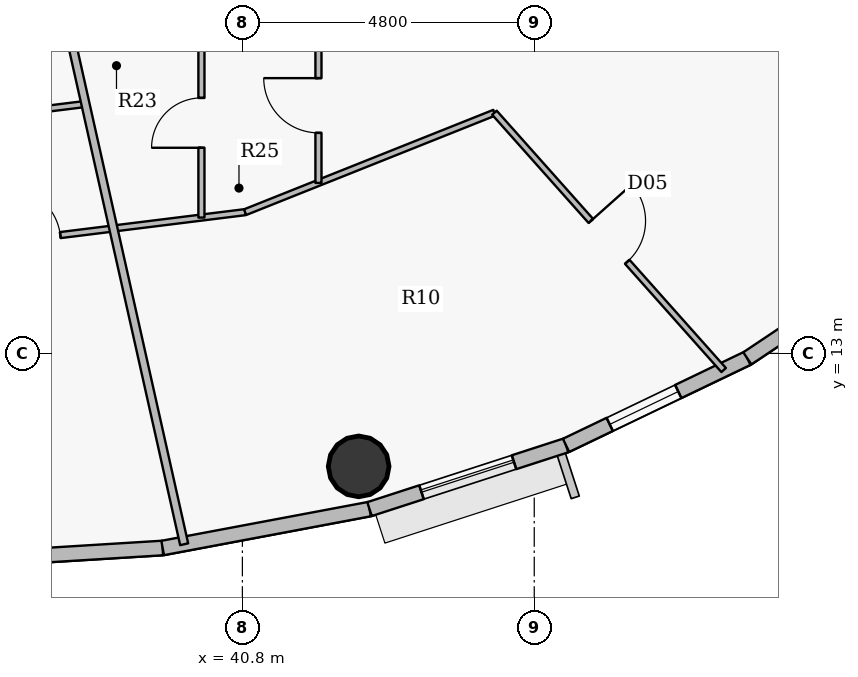
"""IFC4 building model, lengths in metres.
Left out: names, types, materials, properties, quantities, classifications, styles, units other than length and angle.
Written with IfcOpenShell. Run it as: python <this file> out.ifc"""

import sys

from ifc_helpers import new_model, si_unit, direction, frame, frame_2d, origin, origin_2d, place, context, subcontext, project, spatial, rectangle, hollow_circle, extrude, source, transform, mapped, element, fill, save


model = new_model("IFC4")
c1 = context("Model", 3, precision=1e-05, world=origin(), true_north=direction((0.0, 1.0)))
c2 = subcontext(c1, "Body", "Model", "MODEL_VIEW")
j1 = project(units=[si_unit("LENGTHUNIT", "METRE"), si_unit("PLANEANGLEUNIT", "RADIAN")], contexts=[c1])
p1 = place(None, origin())
s1 = spatial("IfcSite", under=j1, at=p1, CompositionType="ELEMENT")
p2 = place(p1, origin())
s2 = spatial("IfcBuilding", under=s1, at=p2, CompositionType="ELEMENT")
p3 = place(p2, frame((0.0, 0.0, 299.25)))
s3 = spatial("IfcBuildingStorey", under=s2, at=p3, CompositionType="ELEMENT", Elevation=299.25)
p4 = place(p3, frame((42.712, 11.142, 0.0), z_axis=(0.0, 0.0, 1.0), x_axis=(1.0, 0.0, 0.0)))
e1 = element("IfcColumn", 1, at=p4, inside=s3, PredefinedType="COLUMN", context=c2, shape_type="SweptSolid", body=[
    extrude(hollow_circle(Radius=0.5, WallThickness=0.032, at=origin_2d()), origin(), (0.0, 0.0, 1.0), 3.75),
])
p5 = place(p3, frame((39.489, 9.8, 0.0), z_axis=(0.0, 0.0, 1.0), x_axis=(-0.998104946479, -0.061534671648, 0.0)))
e2 = element("IfcWall", 2, at=p5, inside=s3, PredefinedType="SOLIDWALL", context=c2, shape_type="SweptSolid", body=[
    extrude(rectangle(XDim=3.495, YDim=0.24, at=frame_2d((1.748, 0.0))), origin(), (0.0, 0.0, 1.0), 3.5),
])
p6 = place(p3, frame((42.891, 10.44, 0.0), z_axis=(0.0, 0.0, 1.0), x_axis=(-0.982782655757, -0.184765395959, 0.0)))
e3 = element("IfcWall", 3, at=p6, inside=s3, PredefinedType="SOLIDWALL", context=c2, shape_type="SweptSolid", body=[
    extrude(rectangle(XDim=3.462, YDim=0.24, at=frame_2d((1.731, 0.0))), origin(), (0.0, 0.0, 1.0), 3.5),
])
p7 = place(p3, frame((46.123, 11.488, 0.0), z_axis=(0.0, 0.0, 1.0), x_axis=(-0.95123136723, -0.308478339592, 0.0)))
e4 = element("IfcWall", 4, at=p7, inside=s3, PredefinedType="SOLIDWALL", context=c2, shape_type="SweptSolid", body=[
    extrude(rectangle(XDim=3.398, YDim=0.24, at=frame_2d((1.699, 0.0))), origin(), (0.0, 0.0, 1.0), 3.5),
])
p8 = place(p7, frame((0.899, 0.0, 0.9)))
e5 = element("IfcOpeningElement", 5, at=p8, cuts=e4, PredefinedType="OPENING", context=c2, shape_type="SweptSolid", body=[
    extrude(rectangle(XDim=1.6, YDim=1.75, at=origin_2d()), frame((0.8, 0.13, 0.875), z_axis=(0.0, -1.0, 0.0), x_axis=(1.0, 0.0, 0.0)), (0.0, 0.0, 1.0), 0.26),
])
p9 = place(p3, frame((49.104, 12.918, 0.0), z_axis=(0.0, 0.0, 1.0), x_axis=(-0.901573741254, -0.43262546051, 0.0)))
e6 = element("IfcWall", 6, at=p9, inside=s3, PredefinedType="SOLIDWALL", context=c2, shape_type="SweptSolid", body=[
    extrude(rectangle(XDim=3.307, YDim=0.24, at=frame_2d((1.653, 0.0))), origin(), (0.0, 0.0, 1.0), 3.5),
])
p10 = place(p9, frame((1.26, 0.0, 0.9)))
e7 = element("IfcOpeningElement", 7, at=p10, cuts=e6, PredefinedType="OPENING", context=c2, shape_type="SweptSolid", body=[
    extrude(rectangle(XDim=1.25, YDim=1.65, at=origin_2d()), frame((0.625, 0.13, 0.825), z_axis=(0.0, -1.0, 0.0), x_axis=(1.0, 0.0, 0.0)), (0.0, 0.0, 1.0), 0.26),
])
p11 = place(p3, frame((51.762, 14.696, 0.0), z_axis=(0.0, 0.0, 1.0), x_axis=(-0.831250592635, -0.55589787933, 0.0)))
e8 = element("IfcWall", 8, at=p11, inside=s3, PredefinedType="SOLIDWALL", context=c2, shape_type="SweptSolid", body=[
    extrude(rectangle(XDim=3.197, YDim=0.24, at=frame_2d((1.599, 0.0))), origin(), (0.0, 0.0, 1.0), 3.5),
])
p12 = place(p11, frame((0.799, 0.0, 0.9)))
e9 = element("IfcOpeningElement", 9, at=p12, cuts=e8, PredefinedType="OPENING", context=c2, shape_type="SweptSolid", body=[
    extrude(rectangle(XDim=1.6, YDim=1.75, at=origin_2d()), frame((0.8, 0.13, 0.875), z_axis=(0.0, -1.0, 0.0), x_axis=(1.0, 0.0, 0.0)), (0.0, 0.0, 1.0), 0.26),
])
p13 = place(p3, frame((36.0, 14.722, 0.0), z_axis=(0.0, 0.0, 1.0), x_axis=(0.99239360053, 0.123105408601, 0.0)))
e10 = element("IfcWall", 10, at=p13, inside=s3, PredefinedType="PARTITIONING", context=c2, shape_type="SweptSolid", body=[
    extrude(rectangle(XDim=4.883, YDim=0.1, at=frame_2d((2.441, 0.0))), origin(), (0.0, 0.0, 1.0), 3.035),
])
p14 = place(p13, frame((0.919, 0.0, 0.0)))
e11 = element("IfcOpeningElement", 11, at=p14, cuts=e10, PredefinedType="OPENING", context=c2, shape_type="SweptSolid", body=[
    extrude(rectangle(XDim=0.9, YDim=2.1, at=origin_2d()), frame((0.45, 0.06, 1.05), z_axis=(0.0, -1.0, 0.0), x_axis=(1.0, 0.0, 0.0)), (0.0, 0.0, 1.0), 0.12),
])
p15 = place(p3, frame((36.0, 16.827, 0.0), z_axis=(0.0, 0.0, 1.0), x_axis=(0.992401670171, 0.123040339085, 0.0)))
e12 = element("IfcWall", 12, at=p15, inside=s3, PredefinedType="PARTITIONING", context=c2, shape_type="SweptSolid", body=[
    extrude(rectangle(XDim=2.236, YDim=0.1, at=frame_2d((1.118, 0.0))), origin(), (0.0, 0.0, 1.0), 3.035),
])
p16 = place(p3, frame((37.939, 18.35, 0.0), z_axis=(0.0, 0.0, 1.0), x_axis=(0.218784248646, -0.975773258777, 0.0)))
e13 = element("IfcWall", 13, at=p16, inside=s3, PredefinedType="PARTITIONING", context=c2, shape_type="SweptSolid", body=[
    extrude(rectangle(XDim=8.699, YDim=0.135, at=frame_2d((4.35, 0.0))), origin(), (0.0, 0.0, 1.0), 2.985),
])
p17 = place(p3, frame((40.126, 15.234, 0.0), z_axis=(0.0, 0.0, 1.0), x_axis=(0.0, 1.0, 0.0)))
e14 = element("IfcWall", 14, at=p17, inside=s3, PredefinedType="PARTITIONING", context=c2, shape_type="SweptSolid", body=[
    extrude(rectangle(XDim=3.116, YDim=0.1, at=frame_2d((1.558, 0.0))), origin(), (0.0, 0.0, 1.0), 3.035),
])
p18 = place(p17, frame((1.148, 0.0, 0.0)))
e15 = element("IfcOpeningElement", 15, at=p18, cuts=e14, PredefinedType="OPENING", context=c2, shape_type="SweptSolid", body=[
    extrude(rectangle(XDim=0.82, YDim=2.1, at=origin_2d()), frame((0.41, 0.06, 1.05), z_axis=(0.0, -1.0, 0.0), x_axis=(1.0, 0.0, 0.0)), (0.0, 0.0, 1.0), 0.12),
])
p19 = place(p3, frame((40.845, 15.323, 0.0), z_axis=(0.0, 0.0, 1.0), x_axis=(0.928815810282, 0.370541752804, 0.0)))
e16 = element("IfcWall", 16, at=p19, inside=s3, PredefinedType="PARTITIONING", context=c2, shape_type="SweptSolid", body=[
    extrude(rectangle(XDim=4.414, YDim=0.1, at=frame_2d((2.207, 0.0))), origin(), (0.0, 0.0, 1.0), 3.035),
])
p20 = place(p3, frame((42.051, 15.804, 0.0), z_axis=(0.0, 0.0, 1.0), x_axis=(0.0, 1.0, 0.0)))
e17 = element("IfcWall", 17, at=p20, inside=s3, PredefinedType="PARTITIONING", context=c2, shape_type="SweptSolid", body=[
    extrude(rectangle(XDim=2.546, YDim=0.1, at=frame_2d((1.273, 0.0))), origin(), (0.0, 0.0, 1.0), 3.5),
])
p21 = place(p20, frame((0.823, 0.0, 0.0)))
e18 = element("IfcOpeningElement", 18, at=p21, cuts=e17, PredefinedType="OPENING", context=c2, shape_type="SweptSolid", body=[
    extrude(rectangle(XDim=0.9, YDim=2.1, at=origin_2d()), frame((0.45, 0.06, 1.05), z_axis=(0.0, -1.0, 0.0), x_axis=(1.0, 0.0, 0.0)), (0.0, 0.0, 1.0), 0.12),
])
p22 = place(p3, frame((44.945, 16.958, 0.0), z_axis=(0.0, 0.0, 1.0), x_axis=(0.665162818086, -0.746698349694, 0.0)))
e19 = element("IfcWall", 19, at=p22, inside=s3, PredefinedType="PARTITIONING", context=c2, shape_type="SweptSolid", body=[
    extrude(rectangle(XDim=5.668, YDim=0.1, at=frame_2d((2.834, 0.0))), origin(), (0.0, 0.0, 1.0), 2.985),
])
p23 = place(p22, frame((2.384, 0.0, 0.0)))
e20 = element("IfcOpeningElement", 20, at=p23, cuts=e19, PredefinedType="OPENING", context=c2, shape_type="SweptSolid", body=[
    extrude(rectangle(XDim=0.9, YDim=2.1, at=origin_2d()), frame((0.45, 0.06, 1.05), z_axis=(0.0, -1.0, 0.0), x_axis=(1.0, 0.0, 0.0)), (0.0, 0.0, 1.0), 0.12),
])
m1 = source(origin(), c2, "Body", "SweptSolid", [
    extrude(rectangle(XDim=1.6, YDim=1.75, at=origin_2d()), frame((0.8, 0.03, 0.875), z_axis=(0.0, -1.0, 0.0), x_axis=(1.0, 0.0, 0.0)), (0.0, 0.0, 1.0), 0.06),
])
p24 = place(p8, origin())
e21 = element("IfcWindow", 21, at=p24, inside=s3, PartitioningType="DOUBLE_PANEL_VERTICAL", PredefinedType="WINDOW", context=c2, shape_type="MappedRepresentation", body=[
    mapped(m1, transform((0.0, 0.0, 0.0), x_axis=(1.0, 0.0, 0.0), y_axis=(0.0, 1.0, 0.0), z_axis=(0.0, 0.0, 1.0), scale=1.0)),
])
fill(e5, e21)
m2 = source(origin(), c2, "Body", "SweptSolid", [
    extrude(rectangle(XDim=1.25, YDim=1.65, at=origin_2d()), frame((0.625, 0.03, 0.825), z_axis=(0.0, -1.0, 0.0), x_axis=(1.0, 0.0, 0.0)), (0.0, 0.0, 1.0), 0.06),
])
p25 = place(p10, origin())
e22 = element("IfcWindow", 22, at=p25, inside=s3, PartitioningType="SINGLE_PANEL", PredefinedType="WINDOW", context=c2, shape_type="MappedRepresentation", body=[
    mapped(m2, transform((0.0, 0.0, 0.0), x_axis=(1.0, 0.0, 0.0), y_axis=(0.0, 1.0, 0.0), z_axis=(0.0, 0.0, 1.0), scale=1.0)),
])
fill(e7, e22)
m3 = source(origin(), c2, "Body", "SweptSolid", [
    extrude(rectangle(XDim=0.9, YDim=2.1, at=origin_2d()), frame((0.45, 0.025, 1.05), z_axis=(0.0, -1.0, 0.0), x_axis=(1.0, 0.0, 0.0)), (0.0, 0.0, 1.0), 0.05),
])
p26 = place(p14, origin())
e23 = element("IfcDoor", 23, at=p26, inside=s3, OperationType="SINGLE_SWING_LEFT", PredefinedType="DOOR", context=c2, shape_type="MappedRepresentation", body=[
    mapped(m3, transform((0.0, 0.0, 0.0), x_axis=(1.0, 0.0, 0.0), y_axis=(0.0, 1.0, 0.0), z_axis=(0.0, 0.0, 1.0), scale=1.0)),
])
fill(e11, e23)
p27 = place(p23, origin())
e24 = element("IfcDoor", 24, at=p27, inside=s3, OperationType="SINGLE_SWING_LEFT", PredefinedType="DOOR", context=c2, shape_type="MappedRepresentation", body=[
    mapped(m3, transform((0.0, 0.0, 0.0), x_axis=(1.0, 0.0, 0.0), y_axis=(0.0, 1.0, 0.0), z_axis=(0.0, 0.0, 1.0), scale=1.0)),
])
fill(e20, e24)
p28 = place(p21, origin())
e25 = element("IfcDoor", 25, at=p28, inside=s3, OperationType="SINGLE_SWING_RIGHT", PredefinedType="DOOR", context=c2, shape_type="MappedRepresentation", body=[
    mapped(m3, transform((0.0, 0.0, 0.0), x_axis=(1.0, 0.0, 0.0), y_axis=(0.0, 1.0, 0.0), z_axis=(0.0, 0.0, 1.0), scale=1.0)),
])
fill(e18, e25)
m4 = source(origin(), c2, "Body", "SweptSolid", [
    extrude(rectangle(XDim=0.82, YDim=2.1, at=origin_2d()), frame((0.41, 0.025, 1.05), z_axis=(0.0, -1.0, 0.0), x_axis=(1.0, 0.0, 0.0)), (0.0, 0.0, 1.0), 0.05),
])
p29 = place(p18, origin())
e26 = element("IfcDoor", 26, at=p29, inside=s3, OperationType="SINGLE_SWING_LEFT", PredefinedType="DOOR", context=c2, shape_type="MappedRepresentation", body=[
    mapped(m4, transform((0.0, 0.0, 0.0), x_axis=(1.0, 0.0, 0.0), y_axis=(0.0, 1.0, 0.0), z_axis=(0.0, 0.0, 1.0), scale=1.0)),
])
fill(e15, e26)
save(model, sys.argv[1])
